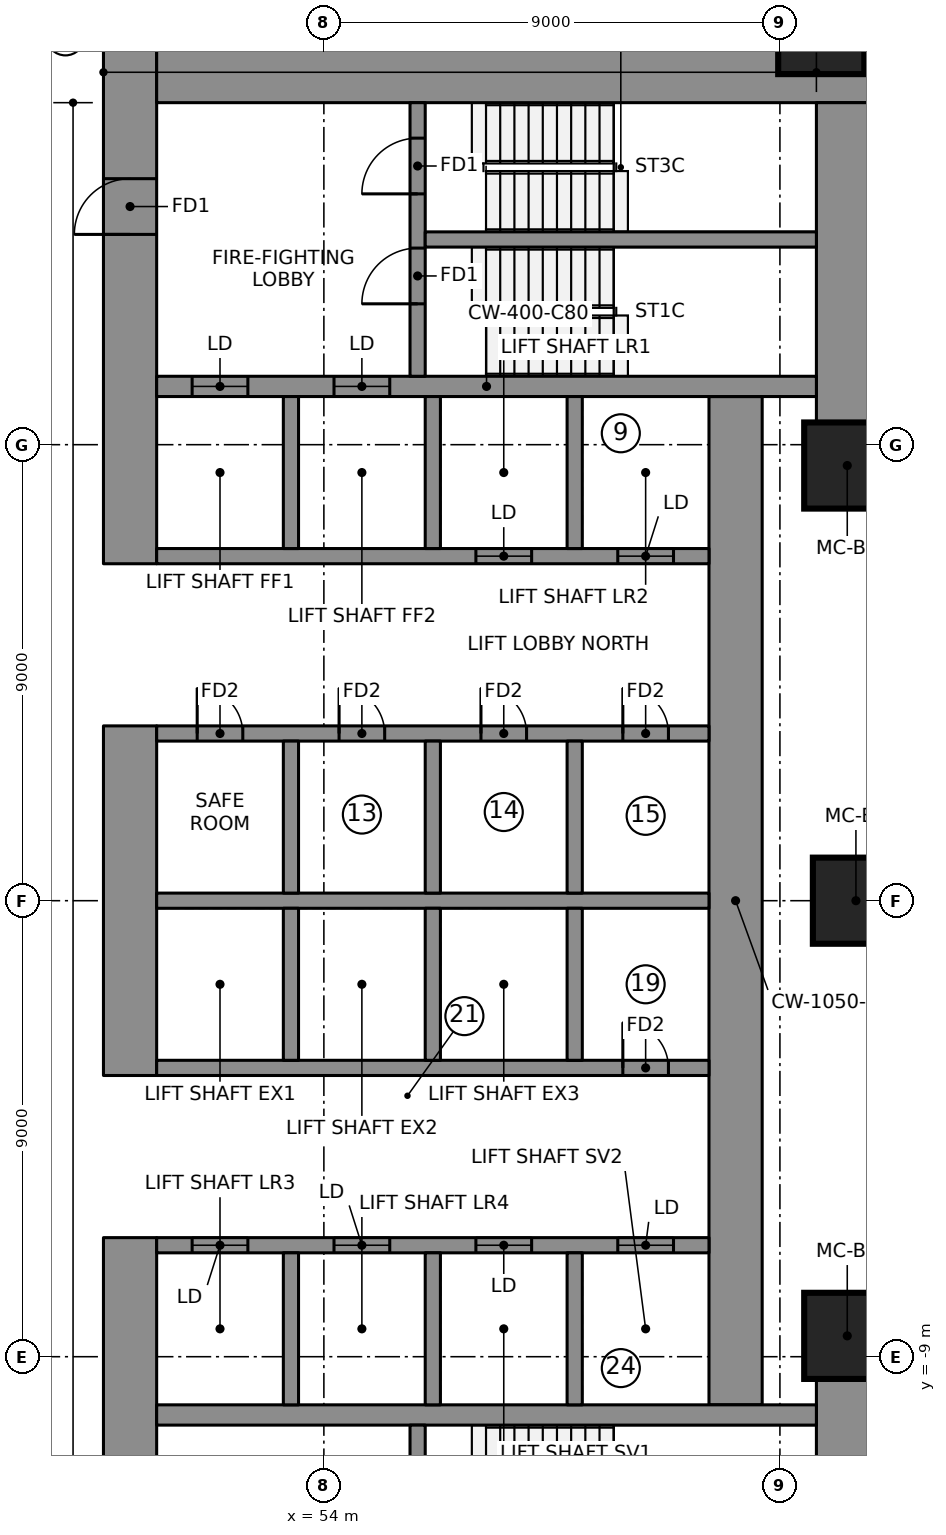
"""IFC4 building model, lengths in metres.
Left out: names, types, materials, properties, quantities, classifications, styles, units other than length and angle.
Written with IfcOpenShell. Run it as: python <this file> out.ifc"""

import sys

from ifc_helpers import new_model, si_unit, direction, frame, frame_2d, origin, origin_2d, place, context, subcontext, project, spatial, rectangle, extrude, element, fill, save


model = new_model("IFC4")
c1 = context("Model", 3, precision=1e-05, world=origin(), true_north=direction((0.0, 1.0)))
c2 = subcontext(c1, "Body", "Model", "MODEL_VIEW")
j1 = project(units=[si_unit("LENGTHUNIT", "METRE"), si_unit("PLANEANGLEUNIT", "RADIAN")], contexts=[c1])
p1 = place(None, origin())
s1 = spatial("IfcSite", under=j1, at=p1, CompositionType="ELEMENT")
p2 = place(p1, origin())
s2 = spatial("IfcBuilding", under=s1, at=p2, CompositionType="ELEMENT")
p3 = place(p2, frame((0.0, 0.0, 84.9)))
s3 = spatial("IfcBuildingStorey", under=s2, at=p3, CompositionType="ELEMENT", Elevation=84.9)
p4 = place(p3, frame((50.175, 6.65, 0.0), z_axis=(0.0, 0.0, 1.0), x_axis=(0.0, 1.0, 0.0)))
e1 = element("IfcWall", 1, at=p4, inside=s3, PredefinedType="SHEAR", context=c2, shape_type="SweptSolid", body=[
    extrude(rectangle(XDim=10.15, YDim=1.05, at=frame_2d((5.075, 0.0))), origin(), (0.0, 0.0, 1.0), 3.55),
])
p5 = place(p4, frame((6.5, 0.0, 0.0)))
e2 = element("IfcOpeningElement", 2, at=p5, cuts=e1, PredefinedType="OPENING", context=c2, shape_type="SweptSolid", body=[
    extrude(rectangle(XDim=1.1, YDim=2.1, at=frame_2d((0.55, 1.05))), frame((0.0, 0.535, 0.0), z_axis=(0.0, -1.0, 0.0), x_axis=(1.0, 0.0, 0.0)), (0.0, 0.0, 1.0), 1.07),
])
p6 = place(p3, frame((50.175, -3.45, 0.0), z_axis=(0.0, 0.0, 1.0), x_axis=(0.0, 1.0, 0.0)))
e3 = element("IfcWall", 3, at=p6, inside=s3, PredefinedType="SHEAR", context=c2, shape_type="SweptSolid", body=[
    extrude(rectangle(XDim=6.9, YDim=1.05, at=frame_2d((3.45, 0.0))), origin(), (0.0, 0.0, 1.0), 3.55),
])
p7 = place(p3, frame((50.175, -16.8, 0.0), z_axis=(0.0, 0.0, 1.0), x_axis=(0.0, 1.0, 0.0)))
e4 = element("IfcWall", 4, at=p7, inside=s3, PredefinedType="SHEAR", context=c2, shape_type="SweptSolid", body=[
    extrude(rectangle(XDim=10.15, YDim=1.05, at=frame_2d((5.075, 0.0))), origin(), (0.0, 0.0, 1.0), 3.55),
])
p8 = place(p7, frame((2.55, 0.0, 0.0)))
e5 = element("IfcOpeningElement", 5, at=p8, cuts=e4, PredefinedType="OPENING", context=c2, shape_type="SweptSolid", body=[
    extrude(rectangle(XDim=1.1, YDim=2.1, at=frame_2d((0.55, 1.05))), frame((0.0, 0.535, 0.0), z_axis=(0.0, -1.0, 0.0), x_axis=(1.0, 0.0, 0.0)), (0.0, 0.0, 1.0), 1.07),
])
p9 = place(p3, frame((50.7, 16.275, 0.0), z_axis=(0.0, 0.0, 1.0), x_axis=(1.0, 0.0, 0.0)))
e6 = element("IfcWall", 6, at=p9, inside=s3, PredefinedType="SHEAR", context=c2, shape_type="SweptSolid", body=[
    extrude(rectangle(XDim=14.07, YDim=1.05, at=frame_2d((7.035, 0.0))), origin(), (0.0, 0.0, 1.0), 3.55),
])
for number, where, z_axis, x_axis in (
    (7, (64.245, 9.389, 0.0), (0.0, 0.0, 1.0), (0.0, 1.0, 0.0)),
    (8, (64.245, -15.75, 0.0), (0.0, 0.0, 1.0), (0.0, 1.0, 0.0)),
):
    element("IfcWall", number, at=place(p3, frame(where, z_axis=z_axis, x_axis=x_axis)), inside=s3, PredefinedType="SHEAR", context=c2, shape_type="SweptSolid", body=[
        extrude(rectangle(XDim=6.361, YDim=1.05, at=frame_2d((3.181, 0.0))), origin(), (0.0, 0.0, 1.0), 3.55),
    ])
p10 = place(p3, frame((62.125, -9.95, 0.0), z_axis=(0.0, 0.0, 1.0), x_axis=(0.0, 1.0, 0.0)))
e9 = element("IfcWall", 9, at=p10, inside=s3, PredefinedType="SHEAR", context=c2, shape_type="SweptSolid", body=[
    extrude(rectangle(XDim=19.9, YDim=1.05, at=frame_2d((9.95, 0.0))), origin(), (0.0, 0.0, 1.0), 3.55),
])
p11 = place(p3, frame((50.7, 10.15, 0.0), z_axis=(0.0, 0.0, 1.0), x_axis=(1.0, 0.0, 0.0)))
e10 = element("IfcWall", 10, at=p11, inside=s3, PredefinedType="SHEAR", context=c2, shape_type="SweptSolid", body=[
    extrude(rectangle(XDim=13.02, YDim=0.4, at=frame_2d((6.51, 0.0))), origin(), (0.0, 0.0, 1.0), 3.55),
])
p12 = place(p11, frame((0.7, 0.0, 0.0)))
e11 = element("IfcOpeningElement", 11, at=p12, cuts=e10, PredefinedType="OPENING", context=c2, shape_type="SweptSolid", body=[
    extrude(rectangle(XDim=1.1, YDim=2.1, at=frame_2d((0.55, 1.05))), frame((0.0, 0.21, 0.0), z_axis=(0.0, -1.0, 0.0), x_axis=(1.0, 0.0, 0.0)), (0.0, 0.0, 1.0), 0.42),
])
p13 = place(p11, frame((3.5, 0.0, 0.0)))
e12 = element("IfcOpeningElement", 12, at=p13, cuts=e10, PredefinedType="OPENING", context=c2, shape_type="SweptSolid", body=[
    extrude(rectangle(XDim=1.1, YDim=2.1, at=frame_2d((0.55, 1.05))), frame((0.0, 0.21, 0.0), z_axis=(0.0, -1.0, 0.0), x_axis=(1.0, 0.0, 0.0)), (0.0, 0.0, 1.0), 0.42),
])
p14 = place(p3, frame((50.7, -10.15, 0.0), z_axis=(0.0, 0.0, 1.0), x_axis=(1.0, 0.0, 0.0)))
e13 = element("IfcWall", 13, at=p14, inside=s3, PredefinedType="SHEAR", context=c2, shape_type="SweptSolid", body=[
    extrude(rectangle(XDim=13.02, YDim=0.4, at=frame_2d((6.51, 0.0))), origin(), (0.0, 0.0, 1.0), 3.55),
])
p15 = place(p3, frame((50.7, 0.0, 0.0), z_axis=(0.0, 0.0, 1.0), x_axis=(1.0, 0.0, 0.0)))
e14 = element("IfcWall", 14, at=p15, inside=s3, PredefinedType="SHEAR", context=c2, shape_type="SweptSolid", body=[
    extrude(rectangle(XDim=10.9, YDim=0.3, at=frame_2d((5.45, 0.0))), origin(), (0.0, 0.0, 1.0), 3.55),
])
p16 = place(p3, frame((50.7, 3.3, 0.0), z_axis=(0.0, 0.0, 1.0), x_axis=(1.0, 0.0, 0.0)))
e15 = element("IfcWall", 15, at=p16, inside=s3, PredefinedType="SHEAR", context=c2, shape_type="SweptSolid", body=[
    extrude(rectangle(XDim=10.9, YDim=0.3, at=frame_2d((5.45, 0.0))), origin(), (0.0, 0.0, 1.0), 3.55),
])
p17 = place(p16, frame((0.8, 0.0, 0.0)))
e16 = element("IfcOpeningElement", 16, at=p17, cuts=e15, PredefinedType="OPENING", context=c2, shape_type="SweptSolid", body=[
    extrude(rectangle(XDim=0.9, YDim=2.1, at=frame_2d((0.45, 1.05))), frame((0.0, 0.16, 0.0), z_axis=(0.0, -1.0, 0.0), x_axis=(1.0, 0.0, 0.0)), (0.0, 0.0, 1.0), 0.32),
])
p18 = place(p16, frame((3.6, 0.0, 0.0)))
e17 = element("IfcOpeningElement", 17, at=p18, cuts=e15, PredefinedType="OPENING", context=c2, shape_type="SweptSolid", body=[
    extrude(rectangle(XDim=0.9, YDim=2.1, at=frame_2d((0.45, 1.05))), frame((0.0, 0.16, 0.0), z_axis=(0.0, -1.0, 0.0), x_axis=(1.0, 0.0, 0.0)), (0.0, 0.0, 1.0), 0.32),
])
p19 = place(p16, frame((6.4, 0.0, 0.0)))
e18 = element("IfcOpeningElement", 18, at=p19, cuts=e15, PredefinedType="OPENING", context=c2, shape_type="SweptSolid", body=[
    extrude(rectangle(XDim=0.9, YDim=2.1, at=frame_2d((0.45, 1.05))), frame((0.0, 0.16, 0.0), z_axis=(0.0, -1.0, 0.0), x_axis=(1.0, 0.0, 0.0)), (0.0, 0.0, 1.0), 0.32),
])
p20 = place(p16, frame((9.2, 0.0, 0.0)))
e19 = element("IfcOpeningElement", 19, at=p20, cuts=e15, PredefinedType="OPENING", context=c2, shape_type="SweptSolid", body=[
    extrude(rectangle(XDim=0.9, YDim=2.1, at=frame_2d((0.45, 1.05))), frame((0.0, 0.16, 0.0), z_axis=(0.0, -1.0, 0.0), x_axis=(1.0, 0.0, 0.0)), (0.0, 0.0, 1.0), 0.32),
])
p21 = place(p3, frame((50.7, 6.8, 0.0), z_axis=(0.0, 0.0, 1.0), x_axis=(1.0, 0.0, 0.0)))
e20 = element("IfcWall", 20, at=p21, inside=s3, PredefinedType="SHEAR", context=c2, shape_type="SweptSolid", body=[
    extrude(rectangle(XDim=10.9, YDim=0.3, at=frame_2d((5.45, 0.0))), origin(), (0.0, 0.0, 1.0), 3.55),
])
p22 = place(p21, frame((6.3, 0.0, 0.0)))
e21 = element("IfcOpeningElement", 21, at=p22, cuts=e20, PredefinedType="OPENING", context=c2, shape_type="SweptSolid", body=[
    extrude(rectangle(XDim=1.1, YDim=2.1, at=frame_2d((0.55, 1.05))), frame((0.0, 0.16, 0.0), z_axis=(0.0, -1.0, 0.0), x_axis=(1.0, 0.0, 0.0)), (0.0, 0.0, 1.0), 0.32),
])
p23 = place(p21, frame((9.1, 0.0, 0.0)))
e22 = element("IfcOpeningElement", 22, at=p23, cuts=e20, PredefinedType="OPENING", context=c2, shape_type="SweptSolid", body=[
    extrude(rectangle(XDim=1.1, YDim=2.1, at=frame_2d((0.55, 1.05))), frame((0.0, 0.16, 0.0), z_axis=(0.0, -1.0, 0.0), x_axis=(1.0, 0.0, 0.0)), (0.0, 0.0, 1.0), 0.32),
])
for number, where, z_axis, x_axis in (
    (23, (53.35, 0.15, 0.0), (0.0, 0.0, 1.0), (0.0, 1.0, 0.0)),
    (24, (53.35, 6.95, 0.0), (0.0, 0.0, 1.0), (0.0, 1.0, 0.0)),
    (25, (56.15, 0.15, 0.0), (0.0, 0.0, 1.0), (0.0, 1.0, 0.0)),
    (26, (56.15, 6.95, 0.0), (0.0, 0.0, 1.0), (0.0, 1.0, 0.0)),
    (27, (58.95, 0.15, 0.0), (0.0, 0.0, 1.0), (0.0, 1.0, 0.0)),
    (28, (58.95, 6.95, 0.0), (0.0, 0.0, 1.0), (0.0, 1.0, 0.0)),
):
    element("IfcWall", number, at=place(p3, frame(where, z_axis=z_axis, x_axis=x_axis)), inside=s3, PredefinedType="SHEAR", context=c2, shape_type="SweptSolid", body=[
        extrude(rectangle(XDim=3.0, YDim=0.3, at=frame_2d((1.5, 0.0))), origin(), (0.0, 0.0, 1.0), 3.55),
    ])
p24 = place(p3, frame((50.7, -3.3, 0.0), z_axis=(0.0, 0.0, 1.0), x_axis=(1.0, 0.0, 0.0)))
e29 = element("IfcWall", 29, at=p24, inside=s3, PredefinedType="SHEAR", context=c2, shape_type="SweptSolid", body=[
    extrude(rectangle(XDim=10.9, YDim=0.3, at=frame_2d((5.45, 0.0))), origin(), (0.0, 0.0, 1.0), 3.55),
])
p25 = place(p24, frame((9.2, 0.0, 0.0)))
e30 = element("IfcOpeningElement", 30, at=p25, cuts=e29, PredefinedType="OPENING", context=c2, shape_type="SweptSolid", body=[
    extrude(rectangle(XDim=0.9, YDim=2.1, at=frame_2d((0.45, 1.05))), frame((0.0, 0.16, 0.0), z_axis=(0.0, -1.0, 0.0), x_axis=(1.0, 0.0, 0.0)), (0.0, 0.0, 1.0), 0.32),
])
p26 = place(p3, frame((50.7, -6.8, 0.0), z_axis=(0.0, 0.0, 1.0), x_axis=(1.0, 0.0, 0.0)))
e31 = element("IfcWall", 31, at=p26, inside=s3, PredefinedType="SHEAR", context=c2, shape_type="SweptSolid", body=[
    extrude(rectangle(XDim=10.9, YDim=0.3, at=frame_2d((5.45, 0.0))), origin(), (0.0, 0.0, 1.0), 3.55),
])
p27 = place(p26, frame((0.7, 0.0, 0.0)))
e32 = element("IfcOpeningElement", 32, at=p27, cuts=e31, PredefinedType="OPENING", context=c2, shape_type="SweptSolid", body=[
    extrude(rectangle(XDim=1.1, YDim=2.1, at=frame_2d((0.55, 1.05))), frame((0.0, 0.16, 0.0), z_axis=(0.0, -1.0, 0.0), x_axis=(1.0, 0.0, 0.0)), (0.0, 0.0, 1.0), 0.32),
])
p28 = place(p26, frame((3.5, 0.0, 0.0)))
e33 = element("IfcOpeningElement", 33, at=p28, cuts=e31, PredefinedType="OPENING", context=c2, shape_type="SweptSolid", body=[
    extrude(rectangle(XDim=1.1, YDim=2.1, at=frame_2d((0.55, 1.05))), frame((0.0, 0.16, 0.0), z_axis=(0.0, -1.0, 0.0), x_axis=(1.0, 0.0, 0.0)), (0.0, 0.0, 1.0), 0.32),
])
p29 = place(p26, frame((6.3, 0.0, 0.0)))
e34 = element("IfcOpeningElement", 34, at=p29, cuts=e31, PredefinedType="OPENING", context=c2, shape_type="SweptSolid", body=[
    extrude(rectangle(XDim=1.1, YDim=2.1, at=frame_2d((0.55, 1.05))), frame((0.0, 0.16, 0.0), z_axis=(0.0, -1.0, 0.0), x_axis=(1.0, 0.0, 0.0)), (0.0, 0.0, 1.0), 0.32),
])
p30 = place(p26, frame((9.1, 0.0, 0.0)))
e35 = element("IfcOpeningElement", 35, at=p30, cuts=e31, PredefinedType="OPENING", context=c2, shape_type="SweptSolid", body=[
    extrude(rectangle(XDim=1.1, YDim=2.1, at=frame_2d((0.55, 1.05))), frame((0.0, 0.16, 0.0), z_axis=(0.0, -1.0, 0.0), x_axis=(1.0, 0.0, 0.0)), (0.0, 0.0, 1.0), 0.32),
])
for number, where, z_axis, x_axis in (
    (36, (53.35, -3.15, 0.0), (0.0, 0.0, 1.0), (0.0, 1.0, 0.0)),
    (37, (53.35, -9.95, 0.0), (0.0, 0.0, 1.0), (0.0, 1.0, 0.0)),
    (38, (56.15, -3.15, 0.0), (0.0, 0.0, 1.0), (0.0, 1.0, 0.0)),
    (39, (56.15, -9.95, 0.0), (0.0, 0.0, 1.0), (0.0, 1.0, 0.0)),
    (40, (58.95, -3.15, 0.0), (0.0, 0.0, 1.0), (0.0, 1.0, 0.0)),
    (41, (58.95, -9.95, 0.0), (0.0, 0.0, 1.0), (0.0, 1.0, 0.0)),
):
    element("IfcWall", number, at=place(p3, frame(where, z_axis=z_axis, x_axis=x_axis)), inside=s3, PredefinedType="SHEAR", context=c2, shape_type="SweptSolid", body=[
        extrude(rectangle(XDim=3.0, YDim=0.3, at=frame_2d((1.5, 0.0))), origin(), (0.0, 0.0, 1.0), 3.55),
    ])
p31 = place(p3, frame((55.85, 10.35, 0.0), z_axis=(0.0, 0.0, 1.0), x_axis=(0.0, 1.0, 0.0)))
e42 = element("IfcWall", 42, at=p31, inside=s3, PredefinedType="SHEAR", context=c2, shape_type="SweptSolid", body=[
    extrude(rectangle(XDim=5.4, YDim=0.3, at=frame_2d((2.7, 0.0))), origin(), (0.0, 0.0, 1.0), 3.55),
])
p32 = place(p31, frame((1.43, 0.0, 0.0)))
e43 = element("IfcOpeningElement", 43, at=p32, cuts=e42, PredefinedType="OPENING", context=c2, shape_type="SweptSolid", body=[
    extrude(rectangle(XDim=1.1, YDim=2.1, at=frame_2d((0.55, 1.05))), frame((0.0, 0.16, 0.0), z_axis=(0.0, -1.0, 0.0), x_axis=(1.0, 0.0, 0.0)), (0.0, 0.0, 1.0), 0.32),
])
p33 = place(p31, frame((3.6, 0.0, 0.0)))
e44 = element("IfcOpeningElement", 44, at=p33, cuts=e42, PredefinedType="OPENING", context=c2, shape_type="SweptSolid", body=[
    extrude(rectangle(XDim=1.1, YDim=2.1, at=frame_2d((0.55, 1.05))), frame((0.0, 0.16, 0.0), z_axis=(0.0, -1.0, 0.0), x_axis=(1.0, 0.0, 0.0)), (0.0, 0.0, 1.0), 0.32),
])
p34 = place(p3, frame((55.85, -15.75, 0.0), z_axis=(0.0, 0.0, 1.0), x_axis=(0.0, 1.0, 0.0)))
e45 = element("IfcWall", 45, at=p34, inside=s3, PredefinedType="SHEAR", context=c2, shape_type="SweptSolid", body=[
    extrude(rectangle(XDim=5.4, YDim=0.3, at=frame_2d((2.7, 0.0))), origin(), (0.0, 0.0, 1.0), 3.55),
])
p35 = place(p34, frame((3.6, 0.0, 0.0)))
e46 = element("IfcOpeningElement", 46, at=p35, cuts=e45, PredefinedType="OPENING", context=c2, shape_type="SweptSolid", body=[
    extrude(rectangle(XDim=1.1, YDim=2.1, at=frame_2d((0.55, 1.05))), frame((0.0, 0.16, 0.0), z_axis=(0.0, -1.0, 0.0), x_axis=(1.0, 0.0, 0.0)), (0.0, 0.0, 1.0), 0.32),
])
p36 = place(p34, frame((0.8, 0.0, 0.0)))
e47 = element("IfcOpeningElement", 47, at=p36, cuts=e45, PredefinedType="OPENING", context=c2, shape_type="SweptSolid", body=[
    extrude(rectangle(XDim=0.9, YDim=2.1, at=frame_2d((0.45, 1.05))), frame((0.0, 0.16, 0.0), z_axis=(0.0, -1.0, 0.0), x_axis=(1.0, 0.0, 0.0)), (0.0, 0.0, 1.0), 0.32),
])
p37 = place(p3, frame((56.0, 13.05, 0.0), z_axis=(0.0, 0.0, 1.0), x_axis=(1.0, 0.0, 0.0)))
e48 = element("IfcWall", 48, at=p37, inside=s3, PredefinedType="SHEAR", context=c2, shape_type="SweptSolid", body=[
    extrude(rectangle(XDim=7.72, YDim=0.3, at=frame_2d((3.86, 0.0))), origin(), (0.0, 0.0, 1.0), 3.55),
])
for number, where, z_axis, x_axis in (
    (49, (64.329, -8.589, 0.0), (0.0, 0.0, 1.0), (1.0, 0.0, 0.0)),
    (50, (64.5, 0.0, 0.0), (0.0, 0.0, 1.0), (1.0, 0.0, 0.0)),
    (51, (64.329, 8.589, 0.0), (0.0, 0.0, 1.0), (1.0, 0.0, 0.0)),
    (52, (63.816, 17.164, 0.0), (0.0, 0.0, 1.0), (1.0, 0.0, 0.0)),
):
    element("IfcColumn", number, at=place(p3, frame(where, z_axis=z_axis, x_axis=x_axis)), inside=s3, PredefinedType="COLUMN", context=c2, shape_type="SweptSolid", body=[
        extrude(rectangle(XDim=1.7, YDim=1.7, at=origin_2d()), origin(), (0.0, 0.0, 1.0), 3.55),
    ])
p38 = place(p12, origin())
e53 = element("IfcDoor", 53, at=p38, inside=s3, OperationType="DOUBLE_DOOR_SLIDING", PredefinedType="DOOR", context=c2, shape_type="SweptSolid", body=[
    extrude(rectangle(XDim=1.1, YDim=2.1, at=frame_2d((0.55, 1.05))), frame((0.0, 0.025, 0.0), z_axis=(0.0, -1.0, 0.0), x_axis=(1.0, 0.0, 0.0)), (0.0, 0.0, 1.0), 0.05),
])
fill(e11, e53)
p39 = place(p13, origin())
e54 = element("IfcDoor", 54, at=p39, inside=s3, OperationType="DOUBLE_DOOR_SLIDING", PredefinedType="DOOR", context=c2, shape_type="SweptSolid", body=[
    extrude(rectangle(XDim=1.1, YDim=2.1, at=frame_2d((0.55, 1.05))), frame((0.0, 0.025, 0.0), z_axis=(0.0, -1.0, 0.0), x_axis=(1.0, 0.0, 0.0)), (0.0, 0.0, 1.0), 0.05),
])
fill(e12, e54)
p40 = place(p22, origin())
e55 = element("IfcDoor", 55, at=p40, inside=s3, OperationType="DOUBLE_DOOR_SLIDING", PredefinedType="DOOR", context=c2, shape_type="SweptSolid", body=[
    extrude(rectangle(XDim=1.1, YDim=2.1, at=frame_2d((0.55, 1.05))), frame((0.0, 0.025, 0.0), z_axis=(0.0, -1.0, 0.0), x_axis=(1.0, 0.0, 0.0)), (0.0, 0.0, 1.0), 0.05),
])
fill(e21, e55)
p41 = place(p23, origin())
e56 = element("IfcDoor", 56, at=p41, inside=s3, OperationType="DOUBLE_DOOR_SLIDING", PredefinedType="DOOR", context=c2, shape_type="SweptSolid", body=[
    extrude(rectangle(XDim=1.1, YDim=2.1, at=frame_2d((0.55, 1.05))), frame((0.0, 0.025, 0.0), z_axis=(0.0, -1.0, 0.0), x_axis=(1.0, 0.0, 0.0)), (0.0, 0.0, 1.0), 0.05),
])
fill(e22, e56)
p42 = place(p27, origin())
e57 = element("IfcDoor", 57, at=p42, inside=s3, OperationType="DOUBLE_DOOR_SLIDING", PredefinedType="DOOR", context=c2, shape_type="SweptSolid", body=[
    extrude(rectangle(XDim=1.1, YDim=2.1, at=frame_2d((0.55, 1.05))), frame((0.0, 0.025, 0.0), z_axis=(0.0, -1.0, 0.0), x_axis=(1.0, 0.0, 0.0)), (0.0, 0.0, 1.0), 0.05),
])
fill(e32, e57)
p43 = place(p28, origin())
e58 = element("IfcDoor", 58, at=p43, inside=s3, OperationType="DOUBLE_DOOR_SLIDING", PredefinedType="DOOR", context=c2, shape_type="SweptSolid", body=[
    extrude(rectangle(XDim=1.1, YDim=2.1, at=frame_2d((0.55, 1.05))), frame((0.0, 0.025, 0.0), z_axis=(0.0, -1.0, 0.0), x_axis=(1.0, 0.0, 0.0)), (0.0, 0.0, 1.0), 0.05),
])
fill(e33, e58)
p44 = place(p29, origin())
e59 = element("IfcDoor", 59, at=p44, inside=s3, OperationType="DOUBLE_DOOR_SLIDING", PredefinedType="DOOR", context=c2, shape_type="SweptSolid", body=[
    extrude(rectangle(XDim=1.1, YDim=2.1, at=frame_2d((0.55, 1.05))), frame((0.0, 0.025, 0.0), z_axis=(0.0, -1.0, 0.0), x_axis=(1.0, 0.0, 0.0)), (0.0, 0.0, 1.0), 0.05),
])
fill(e34, e59)
p45 = place(p30, origin())
e60 = element("IfcDoor", 60, at=p45, inside=s3, OperationType="DOUBLE_DOOR_SLIDING", PredefinedType="DOOR", context=c2, shape_type="SweptSolid", body=[
    extrude(rectangle(XDim=1.1, YDim=2.1, at=frame_2d((0.55, 1.05))), frame((0.0, 0.025, 0.0), z_axis=(0.0, -1.0, 0.0), x_axis=(1.0, 0.0, 0.0)), (0.0, 0.0, 1.0), 0.05),
])
fill(e35, e60)
p46 = place(p32, origin())
e61 = element("IfcDoor", 61, at=p46, inside=s3, OperationType="SINGLE_SWING_RIGHT", PredefinedType="DOOR", context=c2, shape_type="SweptSolid", body=[
    extrude(rectangle(XDim=1.1, YDim=2.1, at=frame_2d((0.55, 1.05))), frame((0.0, 0.025, 0.0), z_axis=(0.0, -1.0, 0.0), x_axis=(1.0, 0.0, 0.0)), (0.0, 0.0, 1.0), 0.05),
])
fill(e43, e61)
p47 = place(p33, origin())
e62 = element("IfcDoor", 62, at=p47, inside=s3, OperationType="SINGLE_SWING_RIGHT", PredefinedType="DOOR", context=c2, shape_type="SweptSolid", body=[
    extrude(rectangle(XDim=1.1, YDim=2.1, at=frame_2d((0.55, 1.05))), frame((0.0, 0.025, 0.0), z_axis=(0.0, -1.0, 0.0), x_axis=(1.0, 0.0, 0.0)), (0.0, 0.0, 1.0), 0.05),
])
fill(e44, e62)
p48 = place(p5, origin())
e63 = element("IfcDoor", 63, at=p48, inside=s3, OperationType="SINGLE_SWING_RIGHT", PredefinedType="DOOR", context=c2, shape_type="SweptSolid", body=[
    extrude(rectangle(XDim=1.1, YDim=2.1, at=frame_2d((0.55, 1.05))), frame((0.0, 0.025, 0.0), z_axis=(0.0, -1.0, 0.0), x_axis=(1.0, 0.0, 0.0)), (0.0, 0.0, 1.0), 0.05),
])
fill(e2, e63)
p49 = place(p17, origin())
e64 = element("IfcDoor", 64, at=p49, inside=s3, OperationType="SINGLE_SWING_LEFT", PredefinedType="DOOR", context=c2, shape_type="SweptSolid", body=[
    extrude(rectangle(XDim=0.9, YDim=2.1, at=frame_2d((0.45, 1.05))), frame((0.0, 0.025, 0.0), z_axis=(0.0, -1.0, 0.0), x_axis=(1.0, 0.0, 0.0)), (0.0, 0.0, 1.0), 0.05),
])
fill(e16, e64)
p50 = place(p18, origin())
e65 = element("IfcDoor", 65, at=p50, inside=s3, OperationType="SINGLE_SWING_LEFT", PredefinedType="DOOR", context=c2, shape_type="SweptSolid", body=[
    extrude(rectangle(XDim=0.9, YDim=2.1, at=frame_2d((0.45, 1.05))), frame((0.0, 0.025, 0.0), z_axis=(0.0, -1.0, 0.0), x_axis=(1.0, 0.0, 0.0)), (0.0, 0.0, 1.0), 0.05),
])
fill(e17, e65)
p51 = place(p19, origin())
e66 = element("IfcDoor", 66, at=p51, inside=s3, OperationType="SINGLE_SWING_LEFT", PredefinedType="DOOR", context=c2, shape_type="SweptSolid", body=[
    extrude(rectangle(XDim=0.9, YDim=2.1, at=frame_2d((0.45, 1.05))), frame((0.0, 0.025, 0.0), z_axis=(0.0, -1.0, 0.0), x_axis=(1.0, 0.0, 0.0)), (0.0, 0.0, 1.0), 0.05),
])
fill(e18, e66)
p52 = place(p20, origin())
e67 = element("IfcDoor", 67, at=p52, inside=s3, OperationType="SINGLE_SWING_LEFT", PredefinedType="DOOR", context=c2, shape_type="SweptSolid", body=[
    extrude(rectangle(XDim=0.9, YDim=2.1, at=frame_2d((0.45, 1.05))), frame((0.0, 0.025, 0.0), z_axis=(0.0, -1.0, 0.0), x_axis=(1.0, 0.0, 0.0)), (0.0, 0.0, 1.0), 0.05),
])
fill(e19, e67)
p53 = place(p25, origin())
e68 = element("IfcDoor", 68, at=p53, inside=s3, OperationType="SINGLE_SWING_LEFT", PredefinedType="DOOR", context=c2, shape_type="SweptSolid", body=[
    extrude(rectangle(XDim=0.9, YDim=2.1, at=frame_2d((0.45, 1.05))), frame((0.0, 0.025, 0.0), z_axis=(0.0, -1.0, 0.0), x_axis=(1.0, 0.0, 0.0)), (0.0, 0.0, 1.0), 0.05),
])
fill(e30, e68)
save(model, sys.argv[1])
